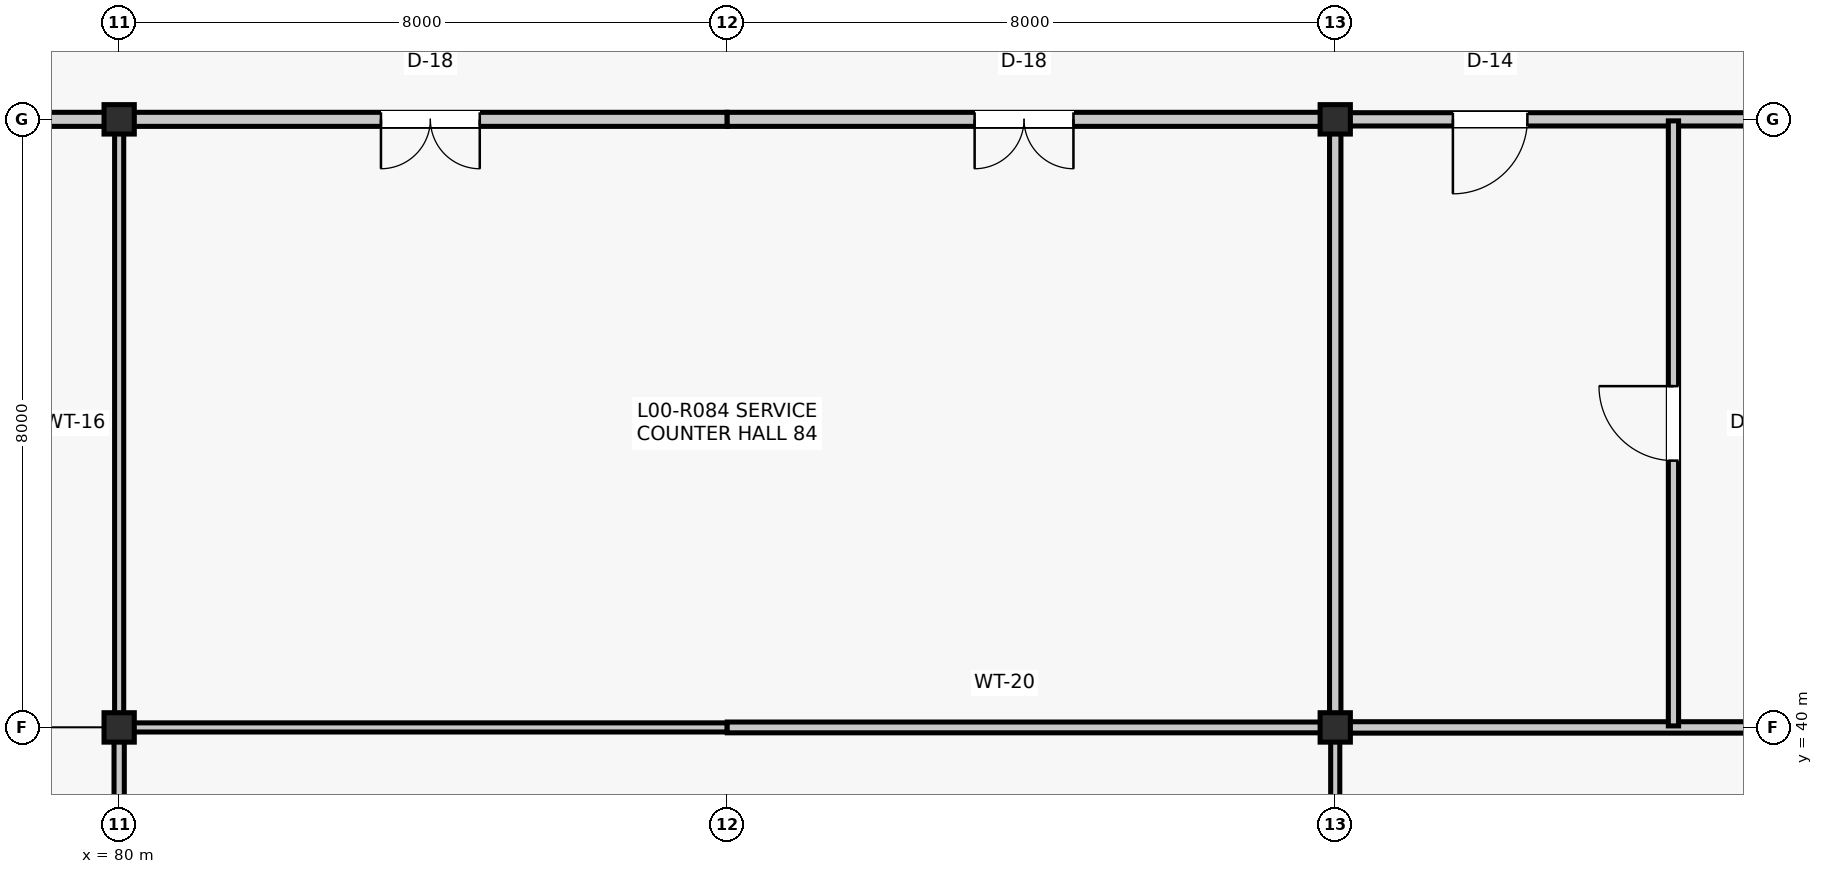
"""IFC4 building model, lengths in metres.
Left out: names, types, materials, properties, quantities, classifications, styles, units other than length and angle.
Written with IfcOpenShell. Run it as: python <this file> out.ifc"""

import sys

from ifc_helpers import new_model, si_unit, direction, frame, frame_2d, origin, origin_2d, place, context, subcontext, project, spatial, rectangle, i_section, extrude, element, fill, save


model = new_model("IFC4")
c1 = context("Model", 3, precision=1e-05, world=origin(), true_north=direction((0.0, 1.0)))
c2 = subcontext(c1, "Body", "Model", "MODEL_VIEW")
j1 = project(units=[si_unit("LENGTHUNIT", "METRE"), si_unit("PLANEANGLEUNIT", "RADIAN")], contexts=[c1])
p1 = place(None, origin())
s1 = spatial("IfcSite", under=j1, at=p1, CompositionType="ELEMENT")
p2 = place(p1, origin())
s2 = spatial("IfcBuilding", under=s1, at=p2, CompositionType="ELEMENT")
p3 = place(p2, origin())
s3 = spatial("IfcBuildingStorey", under=s2, at=p3, CompositionType="ELEMENT", Elevation=0.0)
for number, where, z_axis, x_axis in (
    (1, (80.0, 40.0, 0.0), (0.0, 0.0, 1.0), (1.0, 0.0, 0.0)),
    (2, (80.0, 48.0, 0.0), (0.0, 0.0, 1.0), (1.0, 0.0, 0.0)),
    (3, (96.0, 40.0, 0.0), (0.0, 0.0, 1.0), (1.0, 0.0, 0.0)),
    (4, (96.0, 48.0, 0.0), (0.0, 0.0, 1.0), (1.0, 0.0, 0.0)),
):
    element("IfcColumn", number, at=place(p3, frame(where, z_axis=z_axis, x_axis=x_axis)), inside=s3, PredefinedType="COLUMN", context=c2, shape_type="SweptSolid", body=[
        extrude(i_section(OverallWidth=0.398, OverallDepth=0.387, WebThickness=0.021, FlangeThickness=0.033, FilletRadius=0.015, at=origin_2d()), origin(), (0.0, 0.0, 1.0), 5.28),
    ])
p4 = place(p3, frame((80.0, 32.184, 0.0), z_axis=(0.0, 0.0, 1.0), x_axis=(0.0, 1.0, 0.0)))
e5 = element("IfcWall", 5, at=p4, inside=s3, PredefinedType="PARTITIONING", context=c2, shape_type="SweptSolid", body=[
    extrude(rectangle(XDim=7.633, YDim=0.135, at=frame_2d((3.816, 0.0))), origin(), (0.0, 0.0, 1.0), 4.607),
])
p5 = place(p3, frame((80.0, 40.184, 0.0), z_axis=(0.0, 0.0, 1.0), x_axis=(0.0, 1.0, 0.0)))
e6 = element("IfcWall", 6, at=p5, inside=s3, PredefinedType="PARTITIONING", context=c2, shape_type="SweptSolid", body=[
    extrude(rectangle(XDim=7.633, YDim=0.12, at=frame_2d((3.816, 0.0))), origin(), (0.0, 0.0, 1.0), 4.471),
])
p6 = place(p3, frame((72.415, 48.0, 0.0), z_axis=(0.0, 0.0, 1.0), x_axis=(1.0, 0.0, 0.0)))
e7 = element("IfcWall", 7, at=p6, inside=s3, PredefinedType="PARTITIONING", context=c2, shape_type="SweptSolid", body=[
    extrude(rectangle(XDim=7.396, YDim=0.185, at=frame_2d((3.698, 0.0))), origin(), (0.0, 0.0, 1.0), 4.404),
])
p7 = place(p6, frame((3.048, 0.0, 0.0)))
e8 = element("IfcOpeningElement", 8, at=p7, cuts=e7, PredefinedType="OPENING", context=c2, shape_type="SweptSolid", body=[
    extrude(rectangle(XDim=1.3, YDim=2.2, at=frame_2d((0.65, 1.1))), frame((0.0, 0.103, 0.0), z_axis=(0.0, -1.0, 0.0), x_axis=(1.0, 0.0, 0.0)), (0.0, 0.0, 1.0), 0.205),
])
p8 = place(p3, frame((80.189, 40.0, 0.0), z_axis=(0.0, 0.0, 1.0), x_axis=(1.0, 0.0, 0.0)))
e9 = element("IfcWall", 9, at=p8, inside=s3, PredefinedType="PARTITIONING", context=c2, shape_type="SweptSolid", body=[
    extrude(rectangle(XDim=7.811, YDim=0.12, at=frame_2d((3.906, 0.0))), origin(), (0.0, 0.0, 1.0), 4.262),
])
p9 = place(p3, frame((80.189, 48.0, 0.0), z_axis=(0.0, 0.0, 1.0), x_axis=(1.0, 0.0, 0.0)))
e10 = element("IfcWall", 10, at=p9, inside=s3, PredefinedType="PARTITIONING", context=c2, shape_type="SweptSolid", body=[
    extrude(rectangle(XDim=7.811, YDim=0.185, at=frame_2d((3.906, 0.0))), origin(), (0.0, 0.0, 1.0), 4.097),
])
p10 = place(p9, frame((3.256, 0.0, 0.0)))
e11 = element("IfcOpeningElement", 11, at=p10, cuts=e10, PredefinedType="OPENING", context=c2, shape_type="SweptSolid", body=[
    extrude(rectangle(XDim=1.3, YDim=2.2, at=frame_2d((0.65, 1.1))), frame((0.0, 0.103, 0.0), z_axis=(0.0, -1.0, 0.0), x_axis=(1.0, 0.0, 0.0)), (0.0, 0.0, 1.0), 0.205),
])
p11 = place(p3, frame((96.0, 32.184, 0.0), z_axis=(0.0, 0.0, 1.0), x_axis=(0.0, 1.0, 0.0)))
e12 = element("IfcWall", 12, at=p11, inside=s3, PredefinedType="PARTITIONING", context=c2, shape_type="SweptSolid", body=[
    extrude(rectangle(XDim=7.633, YDim=0.12, at=frame_2d((3.816, 0.0))), origin(), (0.0, 0.0, 1.0), 4.603),
])
p12 = place(p3, frame((88.0, 40.0, 0.0), z_axis=(0.0, 0.0, 1.0), x_axis=(1.0, 0.0, 0.0)))
e13 = element("IfcWall", 13, at=p12, inside=s3, PredefinedType="PARTITIONING", context=c2, shape_type="SweptSolid", body=[
    extrude(rectangle(XDim=7.811, YDim=0.142, at=frame_2d((3.906, 0.0))), origin(), (0.0, 0.0, 1.0), 4.262),
])
p13 = place(p3, frame((96.0, 40.184, 0.0), z_axis=(0.0, 0.0, 1.0), x_axis=(0.0, 1.0, 0.0)))
e14 = element("IfcWall", 14, at=p13, inside=s3, PredefinedType="PARTITIONING", context=c2, shape_type="SweptSolid", body=[
    extrude(rectangle(XDim=7.633, YDim=0.15, at=frame_2d((3.816, 0.0))), origin(), (0.0, 0.0, 1.0), 4.412),
])
p14 = place(p3, frame((88.0, 48.0, 0.0), z_axis=(0.0, 0.0, 1.0), x_axis=(1.0, 0.0, 0.0)))
e15 = element("IfcWall", 15, at=p14, inside=s3, PredefinedType="PARTITIONING", context=c2, shape_type="SweptSolid", body=[
    extrude(rectangle(XDim=7.811, YDim=0.185, at=frame_2d((3.906, 0.0))), origin(), (0.0, 0.0, 1.0), 4.097),
])
p15 = place(p14, frame((3.256, 0.0, 0.0)))
e16 = element("IfcOpeningElement", 16, at=p15, cuts=e15, PredefinedType="OPENING", context=c2, shape_type="SweptSolid", body=[
    extrude(rectangle(XDim=1.3, YDim=2.2, at=frame_2d((0.65, 1.1))), frame((0.0, 0.103, 0.0), z_axis=(0.0, -1.0, 0.0), x_axis=(1.0, 0.0, 0.0)), (0.0, 0.0, 1.0), 0.205),
])
p16 = place(p3, frame((96.189, 40.0, 0.0), z_axis=(0.0, 0.0, 1.0), x_axis=(1.0, 0.0, 0.0)))
e17 = element("IfcWall", 17, at=p16, inside=s3, PredefinedType="PARTITIONING", context=c2, shape_type="SweptSolid", body=[
    extrude(rectangle(XDim=7.396, YDim=0.15, at=frame_2d((3.698, 0.0))), origin(), (0.0, 0.0, 1.0), 4.403),
])
p17 = place(p3, frame((96.189, 48.0, 0.0), z_axis=(0.0, 0.0, 1.0), x_axis=(1.0, 0.0, 0.0)))
e18 = element("IfcWall", 18, at=p17, inside=s3, PredefinedType="PARTITIONING", context=c2, shape_type="SweptSolid", body=[
    extrude(rectangle(XDim=7.396, YDim=0.175, at=frame_2d((3.698, 0.0))), origin(), (0.0, 0.0, 1.0), 4.336),
])
p18 = place(p17, frame((1.359, 0.0, 0.0)))
e19 = element("IfcOpeningElement", 19, at=p18, cuts=e18, PredefinedType="OPENING", context=c2, shape_type="SweptSolid", body=[
    extrude(rectangle(XDim=0.98, YDim=2.15, at=frame_2d((0.49, 1.075))), frame((0.0, 0.097, 0.0), z_axis=(0.0, -1.0, 0.0), x_axis=(1.0, 0.0, 0.0)), (0.0, 0.0, 1.0), 0.195),
])
p19 = place(p17, frame((5.427, 0.0, 0.0)))
e20 = element("IfcOpeningElement", 20, at=p19, cuts=e18, PredefinedType="OPENING", context=c2, shape_type="SweptSolid", body=[
    extrude(rectangle(XDim=0.98, YDim=2.15, at=frame_2d((0.49, 1.075))), frame((0.0, 0.097, 0.0), z_axis=(0.0, -1.0, 0.0), x_axis=(1.0, 0.0, 0.0)), (0.0, 0.0, 1.0), 0.195),
])
p20 = place(p3, frame((100.45, 40.02, 0.0), z_axis=(0.0, 0.0, 1.0), x_axis=(0.0, 1.0, 0.0)))
e21 = element("IfcWall", 21, at=p20, inside=s3, PredefinedType="PARTITIONING", context=c2, shape_type="SweptSolid", body=[
    extrude(rectangle(XDim=7.96, YDim=0.135, at=frame_2d((3.98, 0.0))), origin(), (0.0, 0.0, 1.0), 4.336),
])
p21 = place(p20, frame((3.49, 0.0, 0.0)))
e22 = element("IfcOpeningElement", 22, at=p21, cuts=e21, PredefinedType="OPENING", context=c2, shape_type="SweptSolid", body=[
    extrude(rectangle(XDim=0.98, YDim=2.15, at=frame_2d((0.49, 1.075))), frame((0.0, 0.077, 0.0), z_axis=(0.0, -1.0, 0.0), x_axis=(1.0, 0.0, 0.0)), (0.0, 0.0, 1.0), 0.155),
])
p22 = place(p10, frame((1.3, 0.0, 0.0), z_axis=(0.0, 0.0, 1.0), x_axis=(-1.0, 0.0, 0.0)))
e23 = element("IfcDoor", 23, at=p22, inside=s3, OperationType="DOUBLE_DOOR_SINGLE_SWING", PredefinedType="DOOR", context=c2, shape_type="SweptSolid", body=[
    extrude(rectangle(XDim=1.3, YDim=2.2, at=frame_2d((0.65, 1.1))), frame((0.0, 0.025, 0.0), z_axis=(0.0, -1.0, 0.0), x_axis=(1.0, 0.0, 0.0)), (0.0, 0.0, 1.0), 0.05),
])
fill(e11, e23)
p23 = place(p15, frame((1.3, 0.0, 0.0), z_axis=(0.0, 0.0, 1.0), x_axis=(-1.0, 0.0, 0.0)))
e24 = element("IfcDoor", 24, at=p23, inside=s3, OperationType="DOUBLE_DOOR_SINGLE_SWING", PredefinedType="DOOR", context=c2, shape_type="SweptSolid", body=[
    extrude(rectangle(XDim=1.3, YDim=2.2, at=frame_2d((0.65, 1.1))), frame((0.0, 0.025, 0.0), z_axis=(0.0, -1.0, 0.0), x_axis=(1.0, 0.0, 0.0)), (0.0, 0.0, 1.0), 0.05),
])
fill(e16, e24)
p24 = place(p18, frame((0.98, 0.0, 0.0), z_axis=(0.0, 0.0, 1.0), x_axis=(-1.0, 0.0, 0.0)))
e25 = element("IfcDoor", 25, at=p24, inside=s3, OperationType="SINGLE_SWING_LEFT", PredefinedType="DOOR", context=c2, shape_type="SweptSolid", body=[
    extrude(rectangle(XDim=0.98, YDim=2.15, at=frame_2d((0.49, 1.075))), frame((0.0, 0.025, 0.0), z_axis=(0.0, -1.0, 0.0), x_axis=(1.0, 0.0, 0.0)), (0.0, 0.0, 1.0), 0.05),
])
fill(e19, e25)
p25 = place(p21, origin())
e26 = element("IfcDoor", 26, at=p25, inside=s3, OperationType="SINGLE_SWING_RIGHT", PredefinedType="DOOR", context=c2, shape_type="SweptSolid", body=[
    extrude(rectangle(XDim=0.98, YDim=2.15, at=frame_2d((0.49, 1.075))), frame((0.0, 0.025, 0.0), z_axis=(0.0, -1.0, 0.0), x_axis=(1.0, 0.0, 0.0)), (0.0, 0.0, 1.0), 0.05),
])
fill(e22, e26)
save(model, sys.argv[1])
